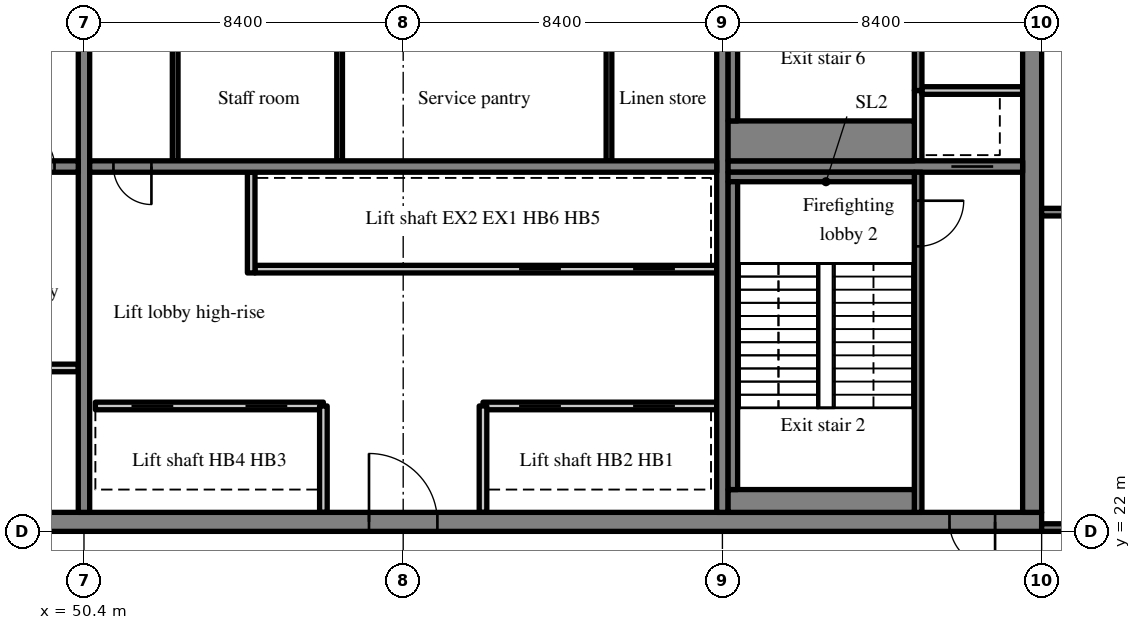
"""IFC4 building model, lengths in metres.
Left out: names, types, materials, properties, quantities, classifications, styles, units other than length and angle.
Written with IfcOpenShell. Run it as: python <this file> out.ifc"""

import sys

from ifc_helpers import new_model, si_unit, direction, frame, frame_2d, origin, place, context, subcontext, project, spatial, rectangle, extrude, source, transform, mapped, element, fill, save


model = new_model("IFC4")
c1 = context("Model", 3, precision=1e-05, world=origin(), true_north=direction((0.0, 1.0)))
c2 = subcontext(c1, "Body", "Model", "MODEL_VIEW")
j1 = project(units=[si_unit("LENGTHUNIT", "METRE"), si_unit("PLANEANGLEUNIT", "RADIAN")], contexts=[c1])
p1 = place(None, origin())
s1 = spatial("IfcSite", under=j1, at=p1, CompositionType="ELEMENT")
p2 = place(p1, origin())
s2 = spatial("IfcBuilding", under=s1, at=p2, CompositionType="ELEMENT")
p3 = place(p2, frame((0.0, 0.0, 293.7)))
s3 = spatial("IfcBuildingStorey", under=s2, at=p3, CompositionType="ELEMENT", Elevation=293.7)
m1 = source(origin(), c2, "Body", "SweptSolid", [
    extrude(rectangle(XDim=50.4, YDim=0.5, at=frame_2d((25.2, 0.0))), origin(), (0.0, 0.0, 1.0), 3.72),
])
p4 = place(p3, frame((25.2, 22.25, 0.0), z_axis=(0.0, 0.0, 1.0), x_axis=(1.0, 0.0, 0.0)))
e1 = element("IfcWall", 1, at=p4, inside=s3, PredefinedType="SHEAR", context=c2, shape_type="MappedRepresentation", body=[
    mapped(m1, transform((0.0, 0.0, 0.0), scale=1.0)),
])
m2 = source(origin(), c2, "Body", "SweptSolid", [
    extrude(rectangle(XDim=1.8, YDim=2.1, at=frame_2d((0.9, 1.05))), frame((0.0, 0.26, 0.0), z_axis=(0.0, -1.0, 0.0), x_axis=(1.0, 0.0, 0.0)), (0.0, 0.0, 1.0), 0.52),
])
p5 = place(p4, frame((15.9, 0.0, 0.0)))
e2 = element("IfcOpeningElement", 2, at=p5, cuts=e1, PredefinedType="OPENING", context=c2, shape_type="MappedRepresentation", body=[
    mapped(m2, transform((0.0, 0.0, 0.0), scale=1.0)),
])
m3 = source(origin(), c2, "Body", "SweptSolid", [
    extrude(rectangle(XDim=0.9, YDim=2.1, at=frame_2d((0.45, 1.05))), frame((0.0, 0.26, 0.0), z_axis=(0.0, -1.0, 0.0), x_axis=(1.0, 0.0, 0.0)), (0.0, 0.0, 1.0), 0.52),
])
p6 = place(p4, frame((9.675, 0.0, 0.0)))
e3 = element("IfcOpeningElement", 3, at=p6, cuts=e1, PredefinedType="OPENING", context=c2, shape_type="MappedRepresentation", body=[
    mapped(m3, transform((0.0, 0.0, 0.0), scale=1.0)),
])
p7 = place(p4, frame((21.525, 0.0, 0.0)))
e4 = element("IfcOpeningElement", 4, at=p7, cuts=e1, PredefinedType="OPENING", context=c2, shape_type="MappedRepresentation", body=[
    mapped(m3, transform((0.0, 0.0, 0.0), scale=1.0)),
])
p8 = place(p4, frame((32.7, 0.0, 0.0)))
e5 = element("IfcOpeningElement", 5, at=p8, cuts=e1, PredefinedType="OPENING", context=c2, shape_type="MappedRepresentation", body=[
    mapped(m2, transform((0.0, 0.0, 0.0), scale=1.0)),
])
m4 = source(origin(), c2, "Body", "SweptSolid", [
    extrude(rectangle(XDim=1.2, YDim=2.1, at=frame_2d((0.6, 1.05))), frame((0.0, 0.26, 0.0), z_axis=(0.0, -1.0, 0.0), x_axis=(1.0, 0.0, 0.0)), (0.0, 0.0, 1.0), 0.52),
])
p9 = place(p4, frame((6.5, 0.0, 0.0)))
e6 = element("IfcOpeningElement", 6, at=p9, cuts=e1, PredefinedType="OPENING", context=c2, shape_type="MappedRepresentation", body=[
    mapped(m4, transform((0.0, 0.0, 0.0), scale=1.0)),
])
p10 = place(p4, frame((47.975, 0.0, 0.0)))
e7 = element("IfcOpeningElement", 7, at=p10, cuts=e1, PredefinedType="OPENING", context=c2, shape_type="MappedRepresentation", body=[
    mapped(m4, transform((0.0, 0.0, 0.0), scale=1.0)),
])
m5 = source(origin(), c2, "Body", "SweptSolid", [
    extrude(rectangle(XDim=19.0, YDim=0.5, at=frame_2d((9.5, 0.0))), origin(), (0.0, 0.0, 1.0), 3.72),
])
p11 = place(p3, frame((75.35, 22.5, 0.0), z_axis=(0.0, 0.0, 1.0), x_axis=(0.0, 1.0, 0.0)))
e8 = element("IfcWall", 8, at=p11, inside=s3, PredefinedType="SHEAR", context=c2, shape_type="MappedRepresentation", body=[
    mapped(m5, transform((0.0, 0.0, 0.0), scale=1.0)),
])
p12 = place(p11, frame((12.9, 0.0, 0.0)))
e9 = element("IfcOpeningElement", 9, at=p12, cuts=e8, PredefinedType="OPENING", context=c2, shape_type="MappedRepresentation", body=[
    mapped(m4, transform((0.0, 0.0, 0.0), scale=1.0)),
])
m6 = source(origin(), c2, "Body", "SweptSolid", [
    extrude(rectangle(XDim=19.0, YDim=0.3, at=frame_2d((9.5, 0.0))), origin(), (0.0, 0.0, 1.0), 3.72),
])
p13 = place(p3, frame((50.4, 22.5, 0.0), z_axis=(0.0, 0.0, 1.0), x_axis=(0.0, 1.0, 0.0)))
e10 = element("IfcWall", 10, at=p13, inside=s3, PredefinedType="SHEAR", context=c2, shape_type="MappedRepresentation", body=[
    mapped(m6, transform((0.0, 0.0, 0.0), scale=1.0)),
])
m7 = source(origin(), c2, "Body", "SweptSolid", [
    extrude(rectangle(XDim=1.1, YDim=2.1, at=frame_2d((0.55, 1.05))), frame((0.0, 0.16, 0.0), z_axis=(0.0, -1.0, 0.0), x_axis=(1.0, 0.0, 0.0)), (0.0, 0.0, 1.0), 0.32),
])
p14 = place(p13, frame((12.95, 0.0, 0.0)))
e11 = element("IfcOpeningElement", 11, at=p14, cuts=e10, PredefinedType="OPENING", context=c2, shape_type="MappedRepresentation", body=[
    mapped(m7, transform((0.0, 0.0, 0.0), scale=1.0)),
])
p15 = place(p3, frame((67.2, 22.5, 0.0), z_axis=(0.0, 0.0, 1.0), x_axis=(0.0, 1.0, 0.0)))
e12 = element("IfcWall", 12, at=p15, inside=s3, PredefinedType="SHEAR", context=c2, shape_type="MappedRepresentation", body=[
    mapped(m6, transform((0.0, 0.0, 0.0), scale=1.0)),
])
m8 = source(origin(), c2, "Body", "SweptSolid", [
    extrude(rectangle(XDim=16.5, YDim=0.3, at=frame_2d((8.25, 0.0))), origin(), (0.0, 0.0, 1.0), 3.72),
])
p16 = place(p3, frame((33.75, 31.6, 0.0), z_axis=(0.0, 0.0, 1.0), x_axis=(1.0, 0.0, 0.0)))
e13 = element("IfcWall", 13, at=p16, inside=s3, PredefinedType="SHEAR", context=c2, shape_type="MappedRepresentation", body=[
    mapped(m8, transform((0.0, 0.0, 0.0), scale=1.0)),
])
m9 = source(origin(), c2, "Body", "SweptSolid", [
    extrude(rectangle(XDim=1.0, YDim=2.1, at=frame_2d((0.5, 1.05))), frame((0.0, 0.16, 0.0), z_axis=(0.0, -1.0, 0.0), x_axis=(1.0, 0.0, 0.0)), (0.0, 0.0, 1.0), 0.32),
])
p17 = place(p16, frame((14.875, 0.0, 0.0)))
e14 = element("IfcOpeningElement", 14, at=p17, cuts=e13, PredefinedType="OPENING", context=c2, shape_type="MappedRepresentation", body=[
    mapped(m9, transform((0.0, 0.0, 0.0), scale=1.0)),
])
p18 = place(p3, frame((50.55, 31.6, 0.0), z_axis=(0.0, 0.0, 1.0), x_axis=(1.0, 0.0, 0.0)))
e15 = element("IfcWall", 15, at=p18, inside=s3, PredefinedType="SHEAR", context=c2, shape_type="MappedRepresentation", body=[
    mapped(m8, transform((0.0, 0.0, 0.0), scale=1.0)),
])
p19 = place(p18, frame((0.625, 0.0, 0.0)))
e16 = element("IfcOpeningElement", 16, at=p19, cuts=e15, PredefinedType="OPENING", context=c2, shape_type="MappedRepresentation", body=[
    mapped(m9, transform((0.0, 0.0, 0.0), scale=1.0)),
])
m10 = source(origin(), c2, "Body", "SweptSolid", [
    extrude(rectangle(XDim=7.75, YDim=0.3, at=frame_2d((3.875, 0.0))), origin(), (0.0, 0.0, 1.0), 3.72),
])
p20 = place(p3, frame((67.35, 31.6, 0.0), z_axis=(0.0, 0.0, 1.0), x_axis=(1.0, 0.0, 0.0)))
e17 = element("IfcWall", 17, at=p20, inside=s3, PredefinedType="SHEAR", context=c2, shape_type="MappedRepresentation", body=[
    mapped(m10, transform((0.0, 0.0, 0.0), scale=1.0)),
])
p21 = place(p20, frame((5.875, 0.0, 0.0)))
e18 = element("IfcOpeningElement", 18, at=p21, cuts=e17, PredefinedType="OPENING", context=c2, shape_type="MappedRepresentation", body=[
    mapped(m7, transform((0.0, 0.0, 0.0), scale=1.0)),
])
m11 = source(origin(), c2, "Body", "SweptSolid", [
    extrude(rectangle(XDim=6.15, YDim=0.2, at=frame_2d((3.075, 0.0))), origin(), (0.0, 0.0, 1.0), 3.72),
])
p22 = place(p3, frame((44.1, 26.3, 0.0), z_axis=(0.0, 0.0, 1.0), x_axis=(1.0, 0.0, 0.0)))
e19 = element("IfcWall", 19, at=p22, inside=s3, PredefinedType="PARTITIONING", context=c2, shape_type="MappedRepresentation", body=[
    mapped(m11, transform((0.0, 0.0, 0.0), scale=1.0)),
])
m12 = source(origin(), c2, "Body", "SweptSolid", [
    extrude(rectangle(XDim=6.15, YDim=0.2, at=frame_2d((3.075, 0.0))), origin(), (0.0, 0.0, 1.0), 3.72),
])
p23 = place(p3, frame((67.05, 25.3, 0.0), z_axis=(0.0, 0.0, 1.0), x_axis=(-1.0, 0.0, 0.0)))
e20 = element("IfcWall", 20, at=p23, inside=s3, PredefinedType="SOLIDWALL", context=c2, shape_type="MappedRepresentation", body=[
    mapped(m12, transform((0.0, 0.0, 0.0), scale=1.0)),
])
m13 = source(origin(), c2, "Body", "SweptSolid", [
    extrude(rectangle(XDim=1.1, YDim=2.1, at=frame_2d((0.55, 1.05))), frame((0.0, 0.11, 0.0), z_axis=(0.0, -1.0, 0.0), x_axis=(1.0, 0.0, 0.0)), (0.0, 0.0, 1.0), 0.22),
])
p24 = place(p23, frame((1.1, 0.0, 0.0)))
e21 = element("IfcOpeningElement", 21, at=p24, cuts=e20, PredefinedType="OPENING", context=c2, shape_type="MappedRepresentation", body=[
    mapped(m13, transform((0.0, 0.0, 0.0), scale=1.0)),
])
p25 = place(p23, frame((4.1, 0.0, 0.0)))
e22 = element("IfcOpeningElement", 22, at=p25, cuts=e20, PredefinedType="OPENING", context=c2, shape_type="MappedRepresentation", body=[
    mapped(m13, transform((0.0, 0.0, 0.0), scale=1.0)),
])
m14 = source(origin(), c2, "Body", "SweptSolid", [
    extrude(rectangle(XDim=6.0, YDim=0.2, at=frame_2d((3.0, 0.0))), origin(), (0.0, 0.0, 1.0), 3.72),
])
p26 = place(p3, frame((56.7, 25.3, 0.0), z_axis=(0.0, 0.0, 1.0), x_axis=(-1.0, 0.0, 0.0)))
e23 = element("IfcWall", 23, at=p26, inside=s3, PredefinedType="SOLIDWALL", context=c2, shape_type="MappedRepresentation", body=[
    mapped(m14, transform((0.0, 0.0, 0.0), scale=1.0)),
])
p27 = place(p26, frame((0.95, 0.0, 0.0)))
e24 = element("IfcOpeningElement", 24, at=p27, cuts=e23, PredefinedType="OPENING", context=c2, shape_type="MappedRepresentation", body=[
    mapped(m13, transform((0.0, 0.0, 0.0), scale=1.0)),
])
p28 = place(p26, frame((3.95, 0.0, 0.0)))
e25 = element("IfcOpeningElement", 25, at=p28, cuts=e23, PredefinedType="OPENING", context=c2, shape_type="MappedRepresentation", body=[
    mapped(m13, transform((0.0, 0.0, 0.0), scale=1.0)),
])
m15 = source(origin(), c2, "Body", "SweptSolid", [
    extrude(rectangle(XDim=12.15, YDim=0.2, at=frame_2d((6.075, 0.0))), origin(), (0.0, 0.0, 1.0), 3.72),
])
p29 = place(p3, frame((67.05, 28.9, 0.0), z_axis=(0.0, 0.0, 1.0), x_axis=(-1.0, 0.0, 0.0)))
e26 = element("IfcWall", 26, at=p29, inside=s3, PredefinedType="SOLIDWALL", context=c2, shape_type="MappedRepresentation", body=[
    mapped(m15, transform((0.0, 0.0, 0.0), scale=1.0)),
])
p30 = place(p29, frame((1.1, 0.0, 0.0)))
e27 = element("IfcOpeningElement", 27, at=p30, cuts=e26, PredefinedType="OPENING", context=c2, shape_type="MappedRepresentation", body=[
    mapped(m13, transform((0.0, 0.0, 0.0), scale=1.0)),
])
p31 = place(p29, frame((4.1, 0.0, 0.0)))
e28 = element("IfcOpeningElement", 28, at=p31, cuts=e26, PredefinedType="OPENING", context=c2, shape_type="MappedRepresentation", body=[
    mapped(m13, transform((0.0, 0.0, 0.0), scale=1.0)),
])
m16 = source(origin(), c2, "Body", "SweptSolid", [
    extrude(rectangle(XDim=2.8, YDim=0.2, at=frame_2d((1.4, 0.0))), origin(), (0.0, 0.0, 1.0), 3.72),
])
for number, where, z_axis, x_axis in (
    (29, (60.9, 22.5, 0.0), (0.0, 0.0, 1.0), (0.0, 1.0, 0.0)),
    (30, (56.7, 22.5, 0.0), (0.0, 0.0, 1.0), (0.0, 1.0, 0.0)),
):
    element("IfcWall", number, at=place(p3, frame(where, z_axis=z_axis, x_axis=x_axis)), inside=s3, PredefinedType="SOLIDWALL", context=c2, shape_type="MappedRepresentation", body=[
        mapped(m16, transform((0.0, 0.0, 0.0), scale=1.0)),
    ])
m17 = source(origin(), c2, "Body", "SweptSolid", [
    extrude(rectangle(XDim=2.65, YDim=0.2, at=frame_2d((1.325, 0.0))), origin(), (0.0, 0.0, 1.0), 3.72),
])
p32 = place(p3, frame((54.8, 28.8, 0.0), z_axis=(0.0, 0.0, 1.0), x_axis=(0.0, 1.0, 0.0)))
e31 = element("IfcWall", 31, at=p32, inside=s3, PredefinedType="SOLIDWALL", context=c2, shape_type="MappedRepresentation", body=[
    mapped(m17, transform((0.0, 0.0, 0.0), scale=1.0)),
])
m18 = source(origin(), c2, "Body", "SweptSolid", [
    extrude(rectangle(XDim=3.25, YDim=0.15, at=frame_2d((1.625, 0.0))), origin(), (0.0, 0.0, 1.0), 3.72),
])
for number, where, z_axis, x_axis in (
    (32, (52.8, 31.75, 0.0), (0.0, 0.0, 1.0), (0.0, 1.0, 0.0)),
    (33, (64.215, 31.75, 0.0), (0.0, 0.0, 1.0), (0.0, 1.0, 0.0)),
    (34, (57.127, 31.75, 0.0), (0.0, 0.0, 1.0), (0.0, 1.0, 0.0)),
):
    element("IfcWall", number, at=place(p3, frame(where, z_axis=z_axis, x_axis=x_axis)), inside=s3, PredefinedType="PARTITIONING", context=c2, shape_type="MappedRepresentation", body=[
        mapped(m18, transform((0.0, 0.0, 0.0), scale=1.0)),
    ])
m19 = source(origin(), c2, "Body", "SweptSolid", [
    extrude(rectangle(XDim=8.95, YDim=0.2, at=frame_2d((4.475, 0.0))), origin(), (0.0, 0.0, 1.0), 3.72),
])
p33 = place(p3, frame((72.35, 22.5, 0.0), z_axis=(0.0, 0.0, 1.0), x_axis=(0.0, 1.0, 0.0)))
e35 = element("IfcWall", 35, at=p33, inside=s3, PredefinedType="SOLIDWALL", context=c2, shape_type="MappedRepresentation", body=[
    mapped(m19, transform((0.0, 0.0, 0.0), scale=1.0)),
])
m20 = source(origin(), c2, "Body", "SweptSolid", [
    extrude(rectangle(XDim=1.2, YDim=2.1, at=frame_2d((0.6, 1.05))), frame((0.0, 0.11, 0.0), z_axis=(0.0, -1.0, 0.0), x_axis=(1.0, 0.0, 0.0)), (0.0, 0.0, 1.0), 0.22),
])
p34 = place(p33, frame((7.0, 0.0, 0.0)))
e36 = element("IfcOpeningElement", 36, at=p34, cuts=e35, PredefinedType="OPENING", context=c2, shape_type="MappedRepresentation", body=[
    mapped(m20, transform((0.0, 0.0, 0.0), scale=1.0)),
])
m21 = source(origin(), c2, "Body", "SweptSolid", [
    extrude(rectangle(XDim=1.85, YDim=0.2, at=frame_2d((0.925, 0.0))), origin(), (0.0, 0.0, 1.0), 3.72),
])
p35 = place(p3, frame((72.35, 31.75, 0.0), z_axis=(0.0, 0.0, 1.0), x_axis=(0.0, 1.0, 0.0)))
e37 = element("IfcWall", 37, at=p35, inside=s3, PredefinedType="SOLIDWALL", context=c2, shape_type="MappedRepresentation", body=[
    mapped(m21, transform((0.0, 0.0, 0.0), scale=1.0)),
])
m22 = source(origin(), c2, "Body", "SweptSolid", [
    extrude(rectangle(XDim=2.65, YDim=0.2, at=frame_2d((1.325, 0.0))), origin(), (0.0, 0.0, 1.0), 3.72),
])
p36 = place(p3, frame((72.45, 33.6, 0.0), z_axis=(0.0, 0.0, 1.0), x_axis=(1.0, 0.0, 0.0)))
e38 = element("IfcWall", 38, at=p36, inside=s3, PredefinedType="SOLIDWALL", context=c2, shape_type="MappedRepresentation", body=[
    mapped(m22, transform((0.0, 0.0, 0.0), scale=1.0)),
])
m23 = source(origin(), c2, "Body", "SweptSolid", [
    extrude(rectangle(XDim=7.9, YDim=0.2, at=frame_2d((3.95, 0.0))), origin(), (0.0, 0.0, 1.0), 3.72),
])
p37 = place(p3, frame((72.35, 33.6, 0.0), z_axis=(0.0, 0.0, 1.0), x_axis=(0.0, 1.0, 0.0)))
e39 = element("IfcWall", 39, at=p37, inside=s3, PredefinedType="SOLIDWALL", context=c2, shape_type="MappedRepresentation", body=[
    mapped(m23, transform((0.0, 0.0, 0.0), scale=1.0)),
])
m24 = source(origin(), c2, "Body", "SweptSolid", [
    extrude(rectangle(XDim=1.8, YDim=2.1, at=frame_2d((0.9, 1.05))), frame((0.0, 0.11, 0.0), z_axis=(0.0, -1.0, 0.0), x_axis=(1.0, 0.0, 0.0)), (0.0, 0.0, 1.0), 0.22),
])
p38 = place(p37, frame((5.3, 0.0, 0.0)))
e40 = element("IfcOpeningElement", 40, at=p38, cuts=e39, PredefinedType="OPENING", context=c2, shape_type="MappedRepresentation", body=[
    mapped(m24, transform((0.0, 0.0, 0.0), scale=1.0)),
])
m25 = source(origin(), c2, "Body", "SweptSolid", [
    extrude(rectangle(XDim=8.15, YDim=0.2, at=frame_2d((4.075, 0.0))), origin(), (0.0, 0.0, 1.0), 3.72),
])
p39 = place(p3, frame((83.75, 22.1, 0.0), z_axis=(0.0, 0.0, 1.0), x_axis=(-1.0, 0.0, 0.0)))
e41 = element("IfcWall", 41, at=p39, inside=s3, PredefinedType="SOLIDWALL", context=c2, shape_type="MappedRepresentation", body=[
    mapped(m25, transform((0.0, 0.0, 0.0), scale=1.0)),
])
p40 = place(p39, frame((5.95, 0.0, 0.0)))
e42 = element("IfcOpeningElement", 42, at=p40, cuts=e41, PredefinedType="OPENING", context=c2, shape_type="MappedRepresentation", body=[
    mapped(m20, transform((0.0, 0.0, 0.0), scale=1.0)),
])
p41 = place(p3, frame((83.75, 30.4, 0.0), z_axis=(0.0, 0.0, 1.0), x_axis=(-1.0, 0.0, 0.0)))
e43 = element("IfcWall", 43, at=p41, inside=s3, PredefinedType="SOLIDWALL", context=c2, shape_type="MappedRepresentation", body=[
    mapped(m25, transform((0.0, 0.0, 0.0), scale=1.0)),
])
m26 = source(origin(), c2, "Body", "SweptSolid", [
    extrude(rectangle(XDim=1.0, YDim=2.1, at=frame_2d((0.5, 1.05))), frame((0.0, 0.11, 0.0), z_axis=(0.0, -1.0, 0.0), x_axis=(1.0, 0.0, 0.0)), (0.0, 0.0, 1.0), 0.22),
])
p42 = place(p41, frame((6.05, 0.0, 0.0)))
e44 = element("IfcOpeningElement", 44, at=p42, cuts=e43, PredefinedType="OPENING", context=c2, shape_type="MappedRepresentation", body=[
    mapped(m26, transform((0.0, 0.0, 0.0), scale=1.0)),
])
m27 = source(origin(), c2, "Body", "SweptSolid", [
    extrude(rectangle(XDim=4.9, YDim=0.6, at=frame_2d((2.45, 0.0))), origin(), (0.0, 0.0, 1.0), 3.72),
])
p43 = place(p3, frame((67.35, 22.8, 0.0), z_axis=(0.0, 0.0, 1.0), x_axis=(1.0, 0.0, 0.0)))
e45 = element("IfcWall", 45, at=p43, inside=s3, PredefinedType="SOLIDWALL", context=c2, shape_type="MappedRepresentation", body=[
    mapped(m27, transform((0.0, 0.0, 0.0), scale=1.0)),
])
m28 = source(origin(), c2, "Body", "SweptSolid", [
    extrude(rectangle(XDim=4.9, YDim=0.25, at=frame_2d((2.45, 0.0))), origin(), (0.0, 0.0, 1.0), 3.72),
])
p44 = place(p3, frame((67.35, 31.325, 0.0), z_axis=(0.0, 0.0, 1.0), x_axis=(1.0, 0.0, 0.0)))
e46 = element("IfcWall", 46, at=p44, inside=s3, PredefinedType="SOLIDWALL", context=c2, shape_type="MappedRepresentation", body=[
    mapped(m28, transform((0.0, 0.0, 0.0), scale=1.0)),
])
m29 = source(origin(), c2, "Body", "SweptSolid", [
    extrude(rectangle(XDim=8.1, YDim=0.25, at=frame_2d((4.05, 0.0))), origin(), (0.0, 0.0, 1.0), 3.72),
])
p45 = place(p3, frame((67.475, 23.1, 0.0), z_axis=(0.0, 0.0, 1.0), x_axis=(0.0, 1.0, 0.0)))
e47 = element("IfcWall", 47, at=p45, inside=s3, PredefinedType="SOLIDWALL", context=c2, shape_type="MappedRepresentation", body=[
    mapped(m29, transform((0.0, 0.0, 0.0), scale=1.0)),
])
m30 = source(origin(), c2, "Body", "SweptSolid", [
    extrude(rectangle(XDim=4.9, YDim=1.05, at=frame_2d((2.45, 0.0))), origin(), (0.0, 0.0, 1.0), 3.72),
])
p46 = place(p3, frame((67.35, 32.275, 0.0), z_axis=(0.0, 0.0, 1.0), x_axis=(1.0, 0.0, 0.0)))
e48 = element("IfcWall", 48, at=p46, inside=s3, PredefinedType="SOLIDWALL", context=c2, shape_type="MappedRepresentation", body=[
    mapped(m30, transform((0.0, 0.0, 0.0), scale=1.0)),
])
p47 = place(p3, frame((67.475, 32.8, 0.0), z_axis=(0.0, 0.0, 1.0), x_axis=(0.0, 1.0, 0.0)))
e49 = element("IfcWall", 49, at=p47, inside=s3, PredefinedType="SOLIDWALL", context=c2, shape_type="MappedRepresentation", body=[
    mapped(m29, transform((0.0, 0.0, 0.0), scale=1.0)),
])
m31 = source(origin(), c2, "Body", "SweptSolid", [
    extrude(rectangle(XDim=1.0, YDim=2.1, at=frame_2d((0.5, 1.05))), frame((0.0, 0.025, 0.0), z_axis=(0.0, -1.0, 0.0), x_axis=(1.0, 0.0, 0.0)), (0.0, 0.0, 1.0), 0.05),
])
p48 = place(p17, origin())
e50 = element("IfcDoor", 50, at=p48, inside=s3, OperationType="SINGLE_SWING_LEFT", PredefinedType="DOOR", context=c2, shape_type="MappedRepresentation", body=[
    mapped(m31, transform((0.0, 0.0, 0.0), scale=1.0)),
])
fill(e14, e50)
m32 = source(origin(), c2, "Body", "SweptSolid", [
    extrude(rectangle(XDim=1.8, YDim=2.1, at=frame_2d((0.9, 1.05))), frame((0.0, 0.175, 0.0), z_axis=(0.0, -1.0, 0.0), x_axis=(1.0, 0.0, 0.0)), (0.0, 0.0, 1.0), 0.05),
])
p49 = place(p8, origin())
e51 = element("IfcDoor", 51, at=p49, inside=s3, OperationType="DOUBLE_DOOR_SINGLE_SWING", PredefinedType="DOOR", context=c2, shape_type="MappedRepresentation", body=[
    mapped(m32, transform((0.0, 0.0, 0.0), scale=1.0)),
])
fill(e5, e51)
p50 = place(p19, origin())
e52 = element("IfcDoor", 52, at=p50, inside=s3, OperationType="SINGLE_SWING_RIGHT", PredefinedType="DOOR", context=c2, shape_type="MappedRepresentation", body=[
    mapped(m31, transform((0.0, 0.0, 0.0), scale=1.0)),
])
fill(e16, e52)
m33 = source(origin(), c2, "Body", "SweptSolid", [
    extrude(rectangle(XDim=1.1, YDim=2.1, at=frame_2d((0.55, 1.05))), frame((0.0, 0.025, 0.0), z_axis=(0.0, -1.0, 0.0), x_axis=(1.0, 0.0, 0.0)), (0.0, 0.0, 1.0), 0.05),
])
p51 = place(p24, origin())
e53 = element("IfcDoor", 53, at=p51, inside=s3, OperationType="SLIDING_TO_RIGHT", PredefinedType="DOOR", context=c2, shape_type="MappedRepresentation", body=[
    mapped(m33, transform((0.0, 0.0, 0.0), scale=1.0)),
])
fill(e21, e53)
p52 = place(p25, origin())
e54 = element("IfcDoor", 54, at=p52, inside=s3, OperationType="SLIDING_TO_LEFT", PredefinedType="DOOR", context=c2, shape_type="MappedRepresentation", body=[
    mapped(m33, transform((0.0, 0.0, 0.0), scale=1.0)),
])
fill(e22, e54)
p53 = place(p27, origin())
e55 = element("IfcDoor", 55, at=p53, inside=s3, OperationType="SLIDING_TO_RIGHT", PredefinedType="DOOR", context=c2, shape_type="MappedRepresentation", body=[
    mapped(m33, transform((0.0, 0.0, 0.0), scale=1.0)),
])
fill(e24, e55)
p54 = place(p28, origin())
e56 = element("IfcDoor", 56, at=p54, inside=s3, OperationType="SLIDING_TO_LEFT", PredefinedType="DOOR", context=c2, shape_type="MappedRepresentation", body=[
    mapped(m33, transform((0.0, 0.0, 0.0), scale=1.0)),
])
fill(e25, e56)
p55 = place(p30, origin())
e57 = element("IfcDoor", 57, at=p55, inside=s3, OperationType="SLIDING_TO_RIGHT", PredefinedType="DOOR", context=c2, shape_type="MappedRepresentation", body=[
    mapped(m33, transform((0.0, 0.0, 0.0), scale=1.0)),
])
fill(e27, e57)
p56 = place(p31, origin())
e58 = element("IfcDoor", 58, at=p56, inside=s3, OperationType="SLIDING_TO_LEFT", PredefinedType="DOOR", context=c2, shape_type="MappedRepresentation", body=[
    mapped(m33, transform((0.0, 0.0, 0.0), scale=1.0)),
])
fill(e28, e58)
m34 = source(origin(), c2, "Body", "SweptSolid", [
    extrude(rectangle(XDim=1.2, YDim=2.1, at=frame_2d((0.6, 1.05))), frame((0.0, 0.025, 0.0), z_axis=(0.0, -1.0, 0.0), x_axis=(1.0, 0.0, 0.0)), (0.0, 0.0, 1.0), 0.05),
])
p57 = place(p34, origin())
e59 = element("IfcDoor", 59, at=p57, inside=s3, OperationType="SINGLE_SWING_RIGHT", PredefinedType="DOOR", context=c2, shape_type="MappedRepresentation", body=[
    mapped(m34, transform((0.0, 0.0, 0.0), scale=1.0)),
])
fill(e36, e59)
m35 = source(origin(), c2, "Body", "SweptSolid", [
    extrude(rectangle(XDim=1.2, YDim=2.1, at=frame_2d((0.6, 1.05))), frame((0.0, 0.175, 0.0), z_axis=(0.0, -1.0, 0.0), x_axis=(1.0, 0.0, 0.0)), (0.0, 0.0, 1.0), 0.05),
])
p58 = place(p10, origin())
e60 = element("IfcDoor", 60, at=p58, inside=s3, OperationType="SINGLE_SWING_RIGHT", PredefinedType="DOOR", context=c2, shape_type="MappedRepresentation", body=[
    mapped(m35, transform((0.0, 0.0, 0.0), scale=1.0)),
])
fill(e7, e60)
p59 = place(p21, origin())
e61 = element("IfcDoor", 61, at=p59, inside=s3, OperationType="SLIDING_TO_LEFT", PredefinedType="DOOR", context=c2, shape_type="MappedRepresentation", body=[
    mapped(m33, transform((0.0, 0.0, 0.0), scale=1.0)),
])
fill(e18, e61)
save(model, sys.argv[1])
